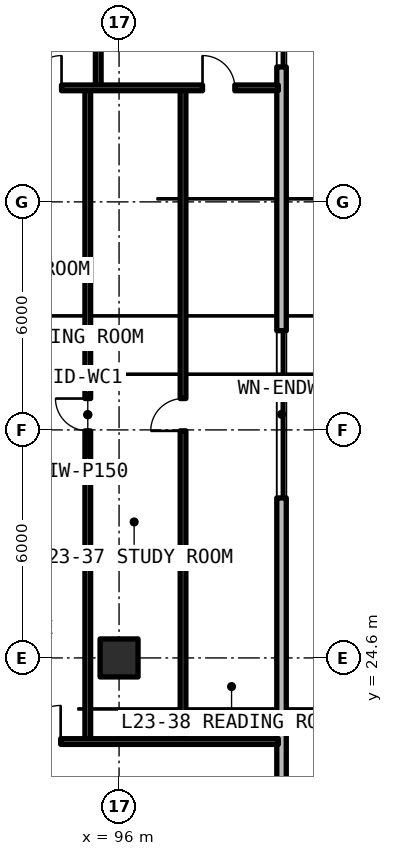
"""IFC4 building model, lengths in metres.
Left out: names, types, materials, properties, quantities, classifications, styles, units other than length and angle.
Written with IfcOpenShell. Run it as: python <this file> out.ifc"""

import sys

from ifc_helpers import new_model, si_unit, direction, frame, frame_2d, origin, origin_2d, place, context, subcontext, project, spatial, rectangle, extrude, element, fill, save


model = new_model("IFC4")
c1 = context("Model", 3, precision=1e-05, world=origin(), true_north=direction((0.0, 1.0)))
c2 = subcontext(c1, "Body", "Model", "MODEL_VIEW")
j1 = project(units=[si_unit("LENGTHUNIT", "METRE"), si_unit("PLANEANGLEUNIT", "RADIAN")], contexts=[c1])
p1 = place(None, origin())
s1 = spatial("IfcSite", under=j1, at=p1, CompositionType="ELEMENT")
p2 = place(p1, origin())
s2 = spatial("IfcBuilding", under=s1, at=p2, CompositionType="ELEMENT")
p3 = place(p2, frame((0.0, 0.0, 85.47)))
s3 = spatial("IfcBuildingStorey", under=s2, at=p3, CompositionType="ELEMENT", Elevation=85.47)
p4 = place(p3, frame((96.0, 24.6, 0.0), z_axis=(0.0, 0.0, 1.0), x_axis=(1.0, 0.0, 0.0)))
e1 = element("IfcColumn", 1, at=p4, inside=s3, PredefinedType="COLUMN", context=c2, shape_type="SweptSolid", body=[
    extrude(rectangle(XDim=1.0, YDim=1.0, at=origin_2d()), origin(), (0.0, 0.0, 1.0), 3.3),
])
p5 = place(p3, frame((100.275, 13.852, 0.0), z_axis=(0.0, 0.0, 1.0), x_axis=(0.0, 1.0, 0.0)))
e2 = element("IfcWall", 2, at=p5, inside=s3, PredefinedType="SOLIDWALL", context=c2, shape_type="SweptSolid", body=[
    extrude(rectangle(XDim=39.496, YDim=0.25, at=frame_2d((19.748, 0.0))), origin(), (0.0, 0.0, 1.0), 3.08),
])
p6 = place(p5, frame((36.448, 0.0, 0.0)))
e3 = element("IfcOpeningElement", 3, at=p6, cuts=e2, PredefinedType="OPENING", context=c2, shape_type="SweptSolid", body=[
    extrude(rectangle(XDim=1.1, YDim=2.15, at=frame_2d((0.55, 1.075))), frame((0.0, 0.135, 0.0), z_axis=(0.0, -1.0, 0.0), x_axis=(1.0, 0.0, 0.0)), (0.0, 0.0, 1.0), 0.27),
])
p7 = place(p5, frame((14.958, 0.0, 0.78)))
e4 = element("IfcOpeningElement", 4, at=p7, cuts=e2, PredefinedType="OPENING", context=c2, shape_type="SweptSolid", body=[
    extrude(rectangle(XDim=4.4, YDim=1.66, at=frame_2d((2.2, 0.83))), frame((0.0, 0.135, 0.0), z_axis=(0.0, -1.0, 0.0), x_axis=(1.0, 0.0, 0.0)), (0.0, 0.0, 1.0), 0.27),
])
p8 = place(p5, frame((26.298, 0.0, 0.78)))
e5 = element("IfcOpeningElement", 5, at=p8, cuts=e2, PredefinedType="OPENING", context=c2, shape_type="SweptSolid", body=[
    extrude(rectangle(XDim=4.4, YDim=1.66, at=frame_2d((2.2, 0.83))), frame((0.0, 0.135, 0.0), z_axis=(0.0, -1.0, 0.0), x_axis=(1.0, 0.0, 0.0)), (0.0, 0.0, 1.0), 0.27),
])
p9 = place(p5, frame((2.454, 0.0, 0.78)))
e6 = element("IfcOpeningElement", 6, at=p9, cuts=e2, PredefinedType="OPENING", context=c2, shape_type="SweptSolid", body=[
    extrude(rectangle(XDim=1.4, YDim=1.65, at=frame_2d((0.7, 0.825))), frame((0.0, 0.135, 0.0), z_axis=(0.0, -1.0, 0.0), x_axis=(1.0, 0.0, 0.0)), (0.0, 0.0, 1.0), 0.27),
])
p10 = place(p3, frame((95.177, 22.4, 0.0), z_axis=(0.0, 0.0, 1.0), x_axis=(0.0, 1.0, 0.0)))
e7 = element("IfcWall", 7, at=p10, inside=s3, PredefinedType="PARTITIONING", context=c2, shape_type="SweptSolid", body=[
    extrude(rectangle(XDim=17.2, YDim=0.15, at=frame_2d((8.6, 0.0))), origin(), (0.0, 0.0, 1.0), 2.35),
])
p11 = place(p10, frame((8.175, 0.0, 0.0)))
e8 = element("IfcOpeningElement", 8, at=p11, cuts=e7, PredefinedType="OPENING", context=c2, shape_type="SweptSolid", body=[
    extrude(rectangle(XDim=0.85, YDim=2.1, at=frame_2d((0.425, 1.05))), frame((0.0, 0.085, 0.0), z_axis=(0.0, -1.0, 0.0), x_axis=(1.0, 0.0, 0.0)), (0.0, 0.0, 1.0), 0.17),
])
p12 = place(p3, frame((97.683, 22.4, 0.0), z_axis=(0.0, 0.0, 1.0), x_axis=(0.0, 1.0, 0.0)))
e9 = element("IfcWall", 9, at=p12, inside=s3, PredefinedType="PARTITIONING", context=c2, shape_type="SweptSolid", body=[
    extrude(rectangle(XDim=17.2, YDim=0.15, at=frame_2d((8.6, 0.0))), origin(), (0.0, 0.0, 1.0), 2.35),
])
p13 = place(p12, frame((8.175, 0.0, 0.0)))
e10 = element("IfcOpeningElement", 10, at=p13, cuts=e9, PredefinedType="OPENING", context=c2, shape_type="SweptSolid", body=[
    extrude(rectangle(XDim=0.85, YDim=2.1, at=frame_2d((0.425, 1.05))), frame((0.0, 0.085, 0.0), z_axis=(0.0, -1.0, 0.0), x_axis=(1.0, 0.0, 0.0)), (0.0, 0.0, 1.0), 0.17),
])
p14 = place(p3, frame((95.452, 39.6, 0.0), z_axis=(0.0, 0.0, 1.0), x_axis=(0.0, 1.0, 0.0)))
e11 = element("IfcWall", 11, at=p14, inside=s3, PredefinedType="PARTITIONING", context=c2, shape_type="SweptSolid", body=[
    extrude(rectangle(XDim=5.2, YDim=0.15, at=frame_2d((2.6, 0.0))), origin(), (0.0, 0.0, 1.0), 2.35),
])
p15 = place(p3, frame((90.32, 39.6, 0.0), z_axis=(0.0, 0.0, 1.0), x_axis=(1.0, 0.0, 0.0)))
e12 = element("IfcWall", 12, at=p15, inside=s3, PredefinedType="PARTITIONING", context=c2, shape_type="SweptSolid", body=[
    extrude(rectangle(XDim=9.87, YDim=0.15, at=frame_2d((4.935, 0.0))), origin(), (0.0, 0.0, 1.0), 2.35),
])
p16 = place(p15, frame((3.316, 0.0, 0.0)))
e13 = element("IfcOpeningElement", 13, at=p16, cuts=e12, PredefinedType="OPENING", context=c2, shape_type="SweptSolid", body=[
    extrude(rectangle(XDim=0.85, YDim=2.1, at=frame_2d((0.425, 1.05))), frame((0.0, 0.085, 0.0), z_axis=(0.0, -1.0, 0.0), x_axis=(1.0, 0.0, 0.0)), (0.0, 0.0, 1.0), 0.17),
])
p17 = place(p15, frame((7.876, 0.0, 0.0)))
e14 = element("IfcOpeningElement", 14, at=p17, cuts=e12, PredefinedType="OPENING", context=c2, shape_type="SweptSolid", body=[
    extrude(rectangle(XDim=0.85, YDim=2.1, at=frame_2d((0.425, 1.05))), frame((0.0, 0.085, 0.0), z_axis=(0.0, -1.0, 0.0), x_axis=(1.0, 0.0, 0.0)), (0.0, 0.0, 1.0), 0.17),
])
p18 = place(p3, frame((90.32, 22.4, 0.0), z_axis=(0.0, 0.0, 1.0), x_axis=(1.0, 0.0, 0.0)))
e15 = element("IfcWall", 15, at=p18, inside=s3, PredefinedType="SOLIDWALL", context=c2, shape_type="SweptSolid", body=[
    extrude(rectangle(XDim=9.87, YDim=0.15, at=frame_2d((4.935, 0.0))), origin(), (0.0, 0.0, 1.0), 2.35),
])
p19 = place(p18, frame((3.193, 0.0, 0.0)))
e16 = element("IfcOpeningElement", 16, at=p19, cuts=e15, PredefinedType="OPENING", context=c2, shape_type="SweptSolid", body=[
    extrude(rectangle(XDim=0.95, YDim=2.15, at=frame_2d((0.475, 1.075))), frame((0.0, 0.085, 0.0), z_axis=(0.0, -1.0, 0.0), x_axis=(1.0, 0.0, 0.0)), (0.0, 0.0, 1.0), 0.17),
])
p20 = place(p7, origin())
e17 = element("IfcWindow", 17, at=p20, inside=s3, PartitioningType="SINGLE_PANEL", PredefinedType="WINDOW", context=c2, shape_type="SweptSolid", body=[
    extrude(rectangle(XDim=4.4, YDim=1.66, at=frame_2d((2.2, 0.83))), frame((0.0, 0.03, 0.0), z_axis=(0.0, -1.0, 0.0), x_axis=(1.0, 0.0, 0.0)), (0.0, 0.0, 1.0), 0.06),
])
fill(e4, e17)
p21 = place(p8, origin())
e18 = element("IfcWindow", 18, at=p21, inside=s3, PartitioningType="SINGLE_PANEL", PredefinedType="WINDOW", context=c2, shape_type="SweptSolid", body=[
    extrude(rectangle(XDim=4.4, YDim=1.66, at=frame_2d((2.2, 0.83))), frame((0.0, 0.03, 0.0), z_axis=(0.0, -1.0, 0.0), x_axis=(1.0, 0.0, 0.0)), (0.0, 0.0, 1.0), 0.06),
])
fill(e5, e18)
p22 = place(p11, origin())
e19 = element("IfcDoor", 19, at=p22, inside=s3, OperationType="SINGLE_SWING_RIGHT", PredefinedType="DOOR", context=c2, shape_type="SweptSolid", body=[
    extrude(rectangle(XDim=0.85, YDim=2.1, at=frame_2d((0.425, 1.05))), frame((0.0, 0.025, 0.0), z_axis=(0.0, -1.0, 0.0), x_axis=(1.0, 0.0, 0.0)), (0.0, 0.0, 1.0), 0.05),
])
fill(e8, e19)
p23 = place(p13, origin())
e20 = element("IfcDoor", 20, at=p23, inside=s3, OperationType="SINGLE_SWING_LEFT", PredefinedType="DOOR", context=c2, shape_type="SweptSolid", body=[
    extrude(rectangle(XDim=0.85, YDim=2.1, at=frame_2d((0.425, 1.05))), frame((0.0, 0.025, 0.0), z_axis=(0.0, -1.0, 0.0), x_axis=(1.0, 0.0, 0.0)), (0.0, 0.0, 1.0), 0.05),
])
fill(e10, e20)
p24 = place(p16, origin())
e21 = element("IfcDoor", 21, at=p24, inside=s3, OperationType="SINGLE_SWING_RIGHT", PredefinedType="DOOR", context=c2, shape_type="SweptSolid", body=[
    extrude(rectangle(XDim=0.85, YDim=2.1, at=frame_2d((0.425, 1.05))), frame((0.0, 0.025, 0.0), z_axis=(0.0, -1.0, 0.0), x_axis=(1.0, 0.0, 0.0)), (0.0, 0.0, 1.0), 0.05),
])
fill(e13, e21)
p25 = place(p17, origin())
e22 = element("IfcDoor", 22, at=p25, inside=s3, OperationType="SINGLE_SWING_LEFT", PredefinedType="DOOR", context=c2, shape_type="SweptSolid", body=[
    extrude(rectangle(XDim=0.85, YDim=2.1, at=frame_2d((0.425, 1.05))), frame((0.0, 0.025, 0.0), z_axis=(0.0, -1.0, 0.0), x_axis=(1.0, 0.0, 0.0)), (0.0, 0.0, 1.0), 0.05),
])
fill(e14, e22)
p26 = place(p19, origin())
e23 = element("IfcDoor", 23, at=p26, inside=s3, OperationType="SINGLE_SWING_RIGHT", PredefinedType="DOOR", context=c2, shape_type="SweptSolid", body=[
    extrude(rectangle(XDim=0.95, YDim=2.15, at=frame_2d((0.475, 1.075))), frame((0.0, 0.025, 0.0), z_axis=(0.0, -1.0, 0.0), x_axis=(1.0, 0.0, 0.0)), (0.0, 0.0, 1.0), 0.05),
])
fill(e16, e23)
save(model, sys.argv[1])
